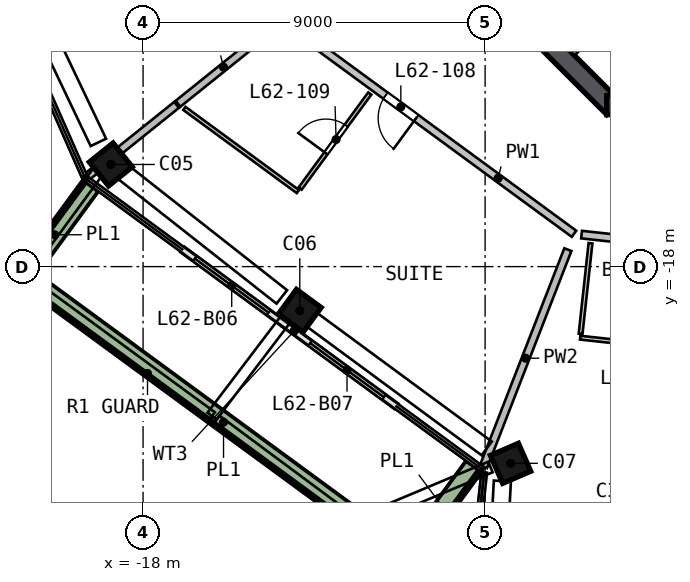
"""IFC4 building model, lengths in metres.
Left out: names, types, materials, properties, quantities, classifications, styles, units other than length and angle.
Written with IfcOpenShell. Run it as: python <this file> out.ifc"""

import sys

from ifc_helpers import new_model, si_unit, direction, frame, frame_2d, origin, origin_2d, place, context, subcontext, project, spatial, rectangle, extrude, element, fill, save


model = new_model("IFC4")
c1 = context("Model", 3, precision=1e-05, world=origin(), true_north=direction((0.0, 1.0)))
c2 = subcontext(c1, "Body", "Model", "MODEL_VIEW")
j1 = project(units=[si_unit("LENGTHUNIT", "METRE"), si_unit("PLANEANGLEUNIT", "RADIAN")], contexts=[c1])
p1 = place(None, origin())
s1 = spatial("IfcSite", under=j1, at=p1, CompositionType="ELEMENT")
p2 = place(p1, origin())
s2 = spatial("IfcBuilding", under=s1, at=p2, CompositionType="ELEMENT")
p3 = place(p2, frame((0.0, 0.0, 252.5)))
s3 = spatial("IfcBuildingStorey", under=s2, at=p3, CompositionType="ELEMENT", Elevation=252.5)
p4 = place(p3, frame((-18.938, -15.204, 0.0), z_axis=(0.07305731, -0.0894781, 0.993305743), x_axis=(-0.621660435, 0.774722887, 0.115510831)))
e1 = element("IfcColumn", 1, at=p4, inside=s3, PredefinedType="COLUMN", context=c2, shape_type="SweptSolid", body=[
    extrude(rectangle(XDim=0.8, YDim=0.8, at=origin_2d()), origin(), (0.0, 0.0, 1.0), 3.211),
])
p5 = place(p3, frame((-13.986, -19.082, 0.0), z_axis=(0.09133384, -0.065781659, 0.99364526), x_axis=(0.80133178, -0.587536537, -0.112553082)))
e2 = element("IfcColumn", 2, at=p5, inside=s3, PredefinedType="COLUMN", context=c2, shape_type="SweptSolid", body=[
    extrude(rectangle(XDim=0.8, YDim=0.8, at=origin_2d()), origin(), (0.0, 0.0, 1.0), 3.21),
])
p6 = place(p3, frame((-8.464, -23.129, 0.0), z_axis=(0.110287503, -0.039372106, 0.993119582), x_axis=(-0.394900113, 0.915222255, 0.080138159)))
e3 = element("IfcColumn", 3, at=p6, inside=s3, PredefinedType="COLUMN", context=c2, shape_type="SweptSolid", body=[
    extrude(rectangle(XDim=0.8, YDim=0.8, at=origin_2d()), origin(), (0.0, 0.0, 1.0), 3.212),
])
p7 = place(p3, frame((-13.823, -5.622, 0.0), z_axis=(0.0, 0.0, 1.0), x_axis=(0.707106781, -0.707106781, 0.0)))
e4 = element("IfcWall", 4, at=p7, inside=s3, PredefinedType="SHEAR", context=c2, shape_type="SweptSolid", body=[
    extrude(rectangle(XDim=11.598, YDim=0.5, at=frame_2d((5.799, 0.0))), origin(), (0.0, 0.0, 1.0), 3.5),
])
p8 = place(p7, frame((2.099, 0.0, 0.0)))
e5 = element("IfcOpeningElement", 5, at=p8, cuts=e4, PredefinedType="OPENING", context=c2, shape_type="SweptSolid", body=[
    extrude(rectangle(XDim=1.2, YDim=2.1, at=frame_2d((0.6, 1.05))), frame((0.0, 0.26, 0.0), z_axis=(0.0, -1.0, 0.0), x_axis=(1.0, 0.0, 0.0)), (0.0, 0.0, 1.0), 0.52),
])
p9 = place(p3, frame((-5.799, -13.75, 0.0), z_axis=(0.0, 0.0, 1.0), x_axis=(1.0, 0.0, 0.0)))
e6 = element("IfcWall", 6, at=p9, inside=s3, PredefinedType="SHEAR", context=c2, shape_type="SweptSolid", body=[
    extrude(rectangle(XDim=11.598, YDim=0.5, at=frame_2d((5.799, 0.0))), origin(), (0.0, 0.0, 1.0), 3.5),
])
p10 = place(p3, frame((-16.958, -17.554, 0.0), z_axis=(0.0, 0.0, 1.0), x_axis=(0.806539039, -0.591180835, 0.0)))
e7 = element("IfcWall", 7, at=p10, inside=s3, PredefinedType="SOLIDWALL", context=c2, shape_type="SweptSolid", body=[
    extrude(rectangle(XDim=3.3, YDim=0.15, at=frame_2d((1.65, 0.0))), origin(), (0.0, 0.0, 1.0), 2.525),
])
p11 = place(p10, frame((0.4, 0.0, 0.0)))
e8 = element("IfcOpeningElement", 8, at=p11, cuts=e7, PredefinedType="OPENING", context=c2, shape_type="SweptSolid", body=[
    extrude(rectangle(XDim=2.4, YDim=2.4, at=frame_2d((1.2, 1.2))), frame((0.0, 0.085, 0.0), z_axis=(0.0, -1.0, 0.0), x_axis=(1.0, 0.0, 0.0)), (0.0, 0.0, 1.0), 0.17),
])
p12 = place(p3, frame((-14.296, -19.505, 0.0), z_axis=(0.0, 0.0, 1.0), x_axis=(0.806553373, -0.591161278, 0.0)))
e9 = element("IfcWall", 9, at=p12, inside=s3, PredefinedType="SOLIDWALL", context=c2, shape_type="SweptSolid", body=[
    extrude(rectangle(XDim=3.661, YDim=0.15, at=frame_2d((1.831, 0.0))), origin(), (0.0, 0.0, 1.0), 2.525),
])
p13 = place(p12, frame((0.861, 0.0, 0.0)))
e10 = element("IfcOpeningElement", 10, at=p13, cuts=e9, PredefinedType="OPENING", context=c2, shape_type="SweptSolid", body=[
    extrude(rectangle(XDim=2.4, YDim=2.4, at=frame_2d((1.2, 1.2))), frame((0.0, 0.085, 0.0), z_axis=(0.0, -1.0, 0.0), x_axis=(1.0, 0.0, 0.0)), (0.0, 0.0, 1.0), 0.17),
])
p14 = place(p3, frame((-19.382, -15.872, 0.0), z_axis=(0.0, 0.0, 1.0), x_axis=(-0.591171745, -0.806545701, 0.0)))
e11 = element("IfcWall", 11, at=p14, inside=s3, PredefinedType="SOLIDWALL", context=c2, shape_type="SweptSolid", body=[
    extrude(rectangle(XDim=3.199, YDim=0.5, at=frame_2d((1.6, 0.0))), origin(), (0.0, 0.0, 1.0), 0.7),
])
p15 = place(p3, frame((-20.924, -18.398, 0.0), z_axis=(0.0, 0.0, 1.0), x_axis=(0.80655151, -0.59116382, 0.0)))
e12 = element("IfcWall", 12, at=p15, inside=s3, PredefinedType="SOLIDWALL", context=c2, shape_type="SweptSolid", body=[
    extrude(rectangle(XDim=12.5, YDim=0.5, at=frame_2d((6.25, 0.0))), origin(), (0.0, 0.0, 1.0), 0.7),
])
p16 = place(p3, frame((-10.896, -25.438, 0.0), z_axis=(0.0, 0.0, 1.0), x_axis=(0.591163637, 0.806551644, 0.0)))
e13 = element("IfcWall", 13, at=p16, inside=s3, PredefinedType="SOLIDWALL", context=c2, shape_type="SweptSolid", body=[
    extrude(rectangle(XDim=2.699, YDim=0.5, at=frame_2d((1.349, 0.0))), origin(), (0.0, 0.0, 1.0), 0.7),
])
p17 = place(p3, frame((-3.677, -9.334, 0.0), z_axis=(0.0, 0.0, 1.0), x_axis=(-0.707078393, -0.707135168, 0.0)))
e14 = element("IfcWall", 14, at=p17, inside=s3, PredefinedType="SOLIDWALL", context=c2, shape_type="SweptSolid", body=[
    extrude(rectangle(XDim=4.3, YDim=0.2, at=frame_2d((2.15, 0.0))), origin(), (0.0, 0.0, 1.0), 3.19),
])
p18 = place(p3, frame((-6.66, -17.136, 0.0), z_axis=(0.0, 0.0, 1.0), x_axis=(-0.806536607, 0.591184152, 0.0)))
e15 = element("IfcWall", 15, at=p18, inside=s3, PredefinedType="SOLIDWALL", context=c2, shape_type="SweptSolid", body=[
    extrude(rectangle(XDim=9.317, YDim=0.2, at=frame_2d((4.658, 0.0))), origin(), (0.0, 0.0, 1.0), 3.19),
])
p19 = place(p18, frame((5.15, 0.0, 0.0)))
e16 = element("IfcOpeningElement", 16, at=p19, cuts=e15, PredefinedType="OPENING", context=c2, shape_type="SweptSolid", body=[
    extrude(rectangle(XDim=1.0, YDim=2.1, at=frame_2d((0.5, 1.05))), frame((0.0, 0.11, 0.0), z_axis=(0.0, -1.0, 0.0), x_axis=(1.0, 0.0, 0.0)), (0.0, 0.0, 1.0), 0.22),
])
p20 = place(p3, frame((-6.461, -17.158, 0.0), z_axis=(0.0, 0.0, 1.0), x_axis=(0.994072526, -0.108718961, 0.0)))
e17 = element("IfcWall", 17, at=p20, inside=s3, PredefinedType="SOLIDWALL", context=c2, shape_type="SweptSolid", body=[
    extrude(rectangle(XDim=3.458, YDim=0.2, at=frame_2d((1.729, 0.0))), origin(), (0.0, 0.0, 1.0), 3.19),
])
p21 = place(p3, frame((-17.118, -13.744, 0.0), z_axis=(0.0, 0.0, 1.0), x_axis=(-0.779776076, -0.626058521, 0.0)))
e18 = element("IfcWall", 18, at=p21, inside=s3, PredefinedType="SOLIDWALL", context=c2, shape_type="SweptSolid", body=[
    extrude(rectangle(XDim=3.011, YDim=0.2, at=frame_2d((1.506, 0.0))), origin(), (0.0, 0.0, 1.0), 3.19),
])
p22 = place(p3, frame((-14.685, -11.79, 0.0), z_axis=(0.0, 0.0, 1.0), x_axis=(-0.77978304, -0.626049846, 0.0)))
e19 = element("IfcWall", 19, at=p22, inside=s3, PredefinedType="SOLIDWALL", context=c2, shape_type="SweptSolid", body=[
    extrude(rectangle(XDim=3.074, YDim=0.2, at=frame_2d((1.537, 0.0))), origin(), (0.0, 0.0, 1.0), 3.19),
])
p23 = place(p3, frame((-6.823, -17.553, 0.0), z_axis=(0.0, 0.0, 1.0), x_axis=(-0.362263731, -0.932075635, 0.0)))
e20 = element("IfcWall", 20, at=p23, inside=s3, PredefinedType="SOLIDWALL", context=c2, shape_type="SweptSolid", body=[
    extrude(rectangle(XDim=6.132, YDim=0.2, at=frame_2d((3.066, 0.0))), origin(), (0.0, 0.0, 1.0), 3.19),
])
p24 = place(p3, frame((-13.926, -16.026, 0.0), z_axis=(0.0, 0.0, 1.0), x_axis=(-0.806587268, 0.59111503, 0.0)))
e21 = element("IfcWall", 21, at=p24, inside=s3, PredefinedType="PARTITIONING", context=c2, shape_type="SweptSolid", body=[
    extrude(rectangle(XDim=3.704, YDim=0.1, at=frame_2d((1.852, 0.0))), origin(), (0.0, 0.0, 1.0), 3.19),
])
p25 = place(p3, frame((-13.867, -15.945, 0.0), z_axis=(0.0, 0.0, 1.0), x_axis=(0.591155368, 0.806557704, 0.0)))
e22 = element("IfcWall", 22, at=p25, inside=s3, PredefinedType="PARTITIONING", context=c2, shape_type="SweptSolid", body=[
    extrude(rectangle(XDim=3.1, YDim=0.1, at=frame_2d((1.55, 0.0))), origin(), (0.0, 0.0, 1.0), 3.19),
])
p26 = place(p25, frame((1.15, 0.0, 0.0)))
e23 = element("IfcOpeningElement", 23, at=p26, cuts=e22, PredefinedType="OPENING", context=c2, shape_type="SweptSolid", body=[
    extrude(rectangle(XDim=0.9, YDim=2.1, at=frame_2d((0.45, 1.05))), frame((0.0, 0.06, 0.0), z_axis=(0.0, -1.0, 0.0), x_axis=(1.0, 0.0, 0.0)), (0.0, 0.0, 1.0), 0.12),
])
p27 = place(p3, frame((-6.487, -19.77, 0.0), z_axis=(0.0, 0.0, 1.0), x_axis=(0.108644914, 0.994080622, 0.0)))
e24 = element("IfcWall", 24, at=p27, inside=s3, PredefinedType="PARTITIONING", context=c2, shape_type="SweptSolid", body=[
    extrude(rectangle(XDim=2.4, YDim=0.1, at=frame_2d((1.2, 0.0))), origin(), (0.0, 0.0, 1.0), 3.19),
])
p28 = place(p3, frame((-6.498, -19.87, 0.0), z_axis=(0.0, 0.0, 1.0), x_axis=(0.994071829, -0.108725335, 0.0)))
e25 = element("IfcWall", 25, at=p28, inside=s3, PredefinedType="PARTITIONING", context=c2, shape_type="SweptSolid", body=[
    extrude(rectangle(XDim=3.0, YDim=0.1, at=frame_2d((1.5, 0.0))), origin(), (0.0, 0.0, 1.0), 3.19),
])
p29 = place(p28, frame((1.15, 0.0, 0.0)))
e26 = element("IfcOpeningElement", 26, at=p29, cuts=e25, PredefinedType="OPENING", context=c2, shape_type="SweptSolid", body=[
    extrude(rectangle(XDim=0.9, YDim=2.1, at=frame_2d((0.45, 1.05))), frame((0.0, 0.06, 0.0), z_axis=(0.0, -1.0, 0.0), x_axis=(1.0, 0.0, 0.0)), (0.0, 0.0, 1.0), 0.12),
])
p30 = place(p11, origin())
e27 = element("IfcDoor", 27, at=p30, inside=s3, OperationType="SLIDING_TO_RIGHT", PredefinedType="DOOR", context=c2, shape_type="SweptSolid", body=[
    extrude(rectangle(XDim=2.4, YDim=2.4, at=frame_2d((1.2, 1.2))), frame((0.0, 0.025, 0.0), z_axis=(0.0, -1.0, 0.0), x_axis=(1.0, 0.0, 0.0)), (0.0, 0.0, 1.0), 0.05),
])
fill(e8, e27)
p31 = place(p13, origin())
e28 = element("IfcDoor", 28, at=p31, inside=s3, OperationType="SLIDING_TO_LEFT", PredefinedType="DOOR", context=c2, shape_type="SweptSolid", body=[
    extrude(rectangle(XDim=2.4, YDim=2.4, at=frame_2d((1.2, 1.2))), frame((0.0, 0.025, 0.0), z_axis=(0.0, -1.0, 0.0), x_axis=(1.0, 0.0, 0.0)), (0.0, 0.0, 1.0), 0.05),
])
fill(e10, e28)
p32 = place(p19, origin())
e29 = element("IfcDoor", 29, at=p32, inside=s3, OperationType="SINGLE_SWING_LEFT", PredefinedType="DOOR", context=c2, shape_type="SweptSolid", body=[
    extrude(rectangle(XDim=1.0, YDim=2.1, at=frame_2d((0.5, 1.05))), frame((0.0, 0.025, 0.0), z_axis=(0.0, -1.0, 0.0), x_axis=(1.0, 0.0, 0.0)), (0.0, 0.0, 1.0), 0.05),
])
fill(e16, e29)
p33 = place(p26, origin())
e30 = element("IfcDoor", 30, at=p33, inside=s3, OperationType="SINGLE_SWING_LEFT", PredefinedType="DOOR", context=c2, shape_type="SweptSolid", body=[
    extrude(rectangle(XDim=0.9, YDim=2.1, at=frame_2d((0.45, 1.05))), frame((0.0, 0.025, 0.0), z_axis=(0.0, -1.0, 0.0), x_axis=(1.0, 0.0, 0.0)), (0.0, 0.0, 1.0), 0.05),
])
fill(e23, e30)
save(model, sys.argv[1])
